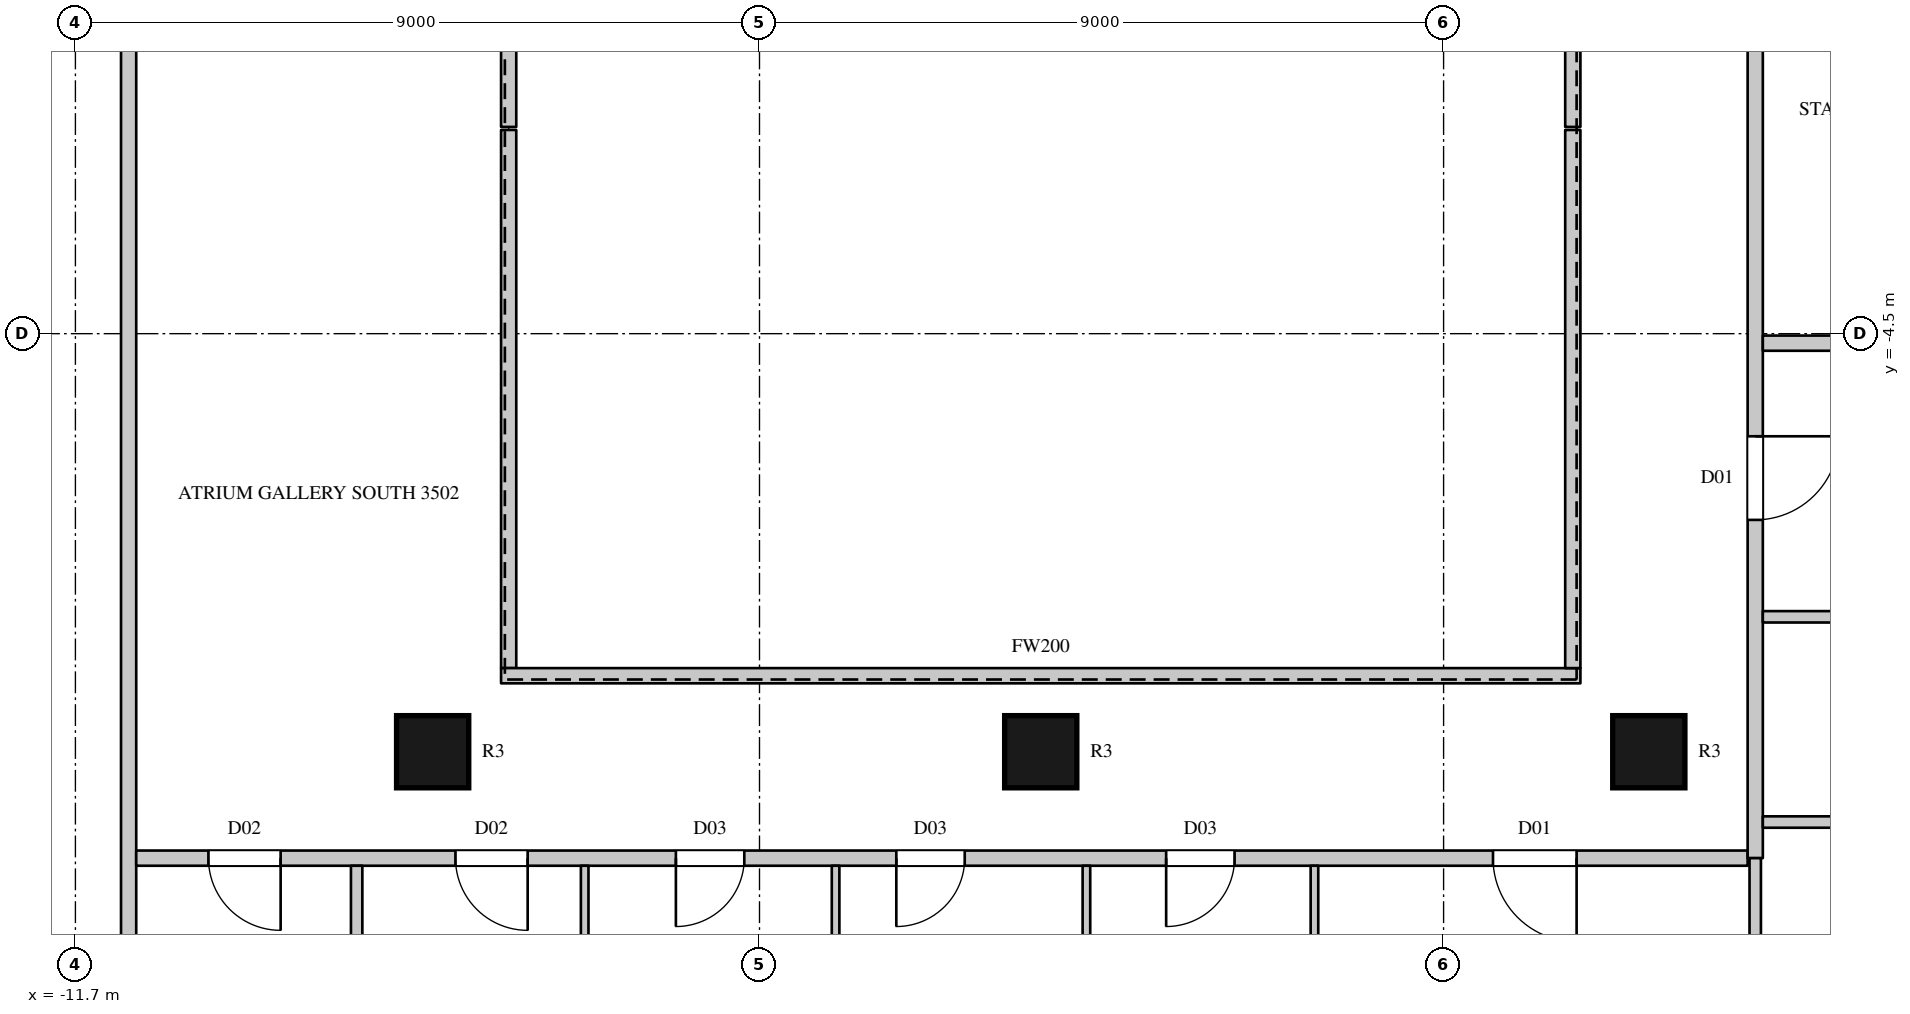
"""IFC4 building model, lengths in metres.
Left out: names, types, materials, properties, quantities, classifications, styles, units other than length and angle.
Written with IfcOpenShell. Run it as: python <this file> out.ifc"""

import sys

from ifc_helpers import new_model, si_unit, direction, frame, frame_2d, origin, origin_2d, place, context, subcontext, project, spatial, rectangle, circle, extrude, element, fill, save


model = new_model("IFC4")
c1 = context("Model", 3, precision=1e-05, world=origin(), true_north=direction((0.0, 1.0)))
c2 = subcontext(c1, "Body", "Model", "MODEL_VIEW")
j1 = project(units=[si_unit("LENGTHUNIT", "METRE"), si_unit("PLANEANGLEUNIT", "RADIAN")], contexts=[c1])
p1 = place(None, origin())
s1 = spatial("IfcSite", under=j1, at=p1, CompositionType="ELEMENT")
p2 = place(p1, origin())
s2 = spatial("IfcBuilding", under=s1, at=p2, CompositionType="ELEMENT")
p3 = place(p2, frame((0.0, 0.0, 164.6)))
s3 = spatial("IfcBuildingStorey", under=s2, at=p3, CompositionType="ELEMENT", Elevation=164.6)
for number, where, z_axis, x_axis in (
    (1, (-7.0, -10.0, 0.0), (0.0, 0.0, 1.0), (1.0, 0.0, 0.0)),
    (2, (1.0, -10.0, 0.0), (0.0, 0.0, 1.0), (1.0, 0.0, 0.0)),
    (3, (9.0, -10.0, 0.0), (0.0, 0.0, 1.0), (1.0, 0.0, 0.0)),
):
    element("IfcColumn", number, at=place(p3, frame(where, z_axis=z_axis, x_axis=x_axis)), inside=s3, PredefinedType="COLUMN", context=c2, shape_type="SweptSolid", body=[
        extrude(circle(Radius=0.475, at=origin_2d()), origin(), (0.0, 0.0, 1.0), 4.1),
    ])
p4 = place(p3, frame((-11.0, -14.8, 0.0), z_axis=(0.0, 0.0, 1.0), x_axis=(0.0, 1.0, 0.0)))
e4 = element("IfcWall", 4, at=p4, inside=s3, PredefinedType="PARTITIONING", context=c2, shape_type="SweptSolid", body=[
    extrude(rectangle(XDim=29.6, YDim=0.2, at=frame_2d((14.8, 0.0))), origin(), (0.0, 0.0, 1.0), 3.8),
])
p5 = place(p4, frame((19.25, 0.0, 0.0)))
e5 = element("IfcOpeningElement", 5, at=p5, cuts=e4, PredefinedType="OPENING", context=c2, shape_type="SweptSolid", body=[
    extrude(rectangle(XDim=1.5, YDim=2.4, at=frame_2d((0.75, 1.2))), frame((0.0, 0.11, 0.0), z_axis=(0.0, -1.0, 0.0), x_axis=(1.0, 0.0, 0.0)), (0.0, 0.0, 1.0), 0.22),
])
p6 = place(p3, frame((-10.9, -11.4, 0.0), z_axis=(0.0, 0.0, 1.0), x_axis=(1.0, 0.0, 0.0)))
e6 = element("IfcWall", 6, at=p6, inside=s3, PredefinedType="PARTITIONING", context=c2, shape_type="SweptSolid", body=[
    extrude(rectangle(XDim=21.2, YDim=0.2, at=frame_2d((10.6, 0.0))), origin(), (0.0, 0.0, 1.0), 3.8),
])
p7 = place(p6, frame((0.95, 0.0, 0.0)))
e7 = element("IfcOpeningElement", 7, at=p7, cuts=e6, PredefinedType="OPENING", context=c2, shape_type="SweptSolid", body=[
    extrude(rectangle(XDim=0.95, YDim=2.2, at=frame_2d((0.475, 1.1))), frame((0.0, 0.11, 0.0), z_axis=(0.0, -1.0, 0.0), x_axis=(1.0, 0.0, 0.0)), (0.0, 0.0, 1.0), 0.22),
])
p8 = place(p6, frame((4.2, 0.0, 0.0)))
e8 = element("IfcOpeningElement", 8, at=p8, cuts=e6, PredefinedType="OPENING", context=c2, shape_type="SweptSolid", body=[
    extrude(rectangle(XDim=0.95, YDim=2.2, at=frame_2d((0.475, 1.1))), frame((0.0, 0.11, 0.0), z_axis=(0.0, -1.0, 0.0), x_axis=(1.0, 0.0, 0.0)), (0.0, 0.0, 1.0), 0.22),
])
p9 = place(p6, frame((7.1, 0.0, 0.0)))
e9 = element("IfcOpeningElement", 9, at=p9, cuts=e6, PredefinedType="OPENING", context=c2, shape_type="SweptSolid", body=[
    extrude(rectangle(XDim=0.9, YDim=2.2, at=frame_2d((0.45, 1.1))), frame((0.0, 0.11, 0.0), z_axis=(0.0, -1.0, 0.0), x_axis=(1.0, 0.0, 0.0)), (0.0, 0.0, 1.0), 0.22),
])
p10 = place(p6, frame((10.0, 0.0, 0.0)))
e10 = element("IfcOpeningElement", 10, at=p10, cuts=e6, PredefinedType="OPENING", context=c2, shape_type="SweptSolid", body=[
    extrude(rectangle(XDim=0.9, YDim=2.2, at=frame_2d((0.45, 1.1))), frame((0.0, 0.11, 0.0), z_axis=(0.0, -1.0, 0.0), x_axis=(1.0, 0.0, 0.0)), (0.0, 0.0, 1.0), 0.22),
])
p11 = place(p6, frame((13.55, 0.0, 0.0)))
e11 = element("IfcOpeningElement", 11, at=p11, cuts=e6, PredefinedType="OPENING", context=c2, shape_type="SweptSolid", body=[
    extrude(rectangle(XDim=0.9, YDim=2.2, at=frame_2d((0.45, 1.1))), frame((0.0, 0.11, 0.0), z_axis=(0.0, -1.0, 0.0), x_axis=(1.0, 0.0, 0.0)), (0.0, 0.0, 1.0), 0.22),
])
p12 = place(p6, frame((17.85, 0.0, 0.0)))
e12 = element("IfcOpeningElement", 12, at=p12, cuts=e6, PredefinedType="OPENING", context=c2, shape_type="SweptSolid", body=[
    extrude(rectangle(XDim=1.1, YDim=2.4, at=frame_2d((0.55, 1.2))), frame((0.0, 0.11, 0.0), z_axis=(0.0, -1.0, 0.0), x_axis=(1.0, 0.0, 0.0)), (0.0, 0.0, 1.0), 0.22),
])
p13 = place(p3, frame((-6.0, -8.9, 0.0), z_axis=(0.0, 0.0, 1.0), x_axis=(0.0, 1.0, 0.0)))
e13 = element("IfcWall", 13, at=p13, inside=s3, PredefinedType="PARTITIONING", context=c2, shape_type="SweptSolid", body=[
    extrude(rectangle(XDim=7.08, YDim=0.2, at=frame_2d((3.54, 0.0))), origin(), (0.0, 0.0, 1.0), 3.8),
])
p14 = place(p3, frame((-6.1, -9.0, 0.0), z_axis=(0.0, 0.0, 1.0), x_axis=(1.0, 0.0, 0.0)))
e14 = element("IfcWall", 14, at=p14, inside=s3, PredefinedType="PARTITIONING", context=c2, shape_type="SweptSolid", body=[
    extrude(rectangle(XDim=14.2, YDim=0.2, at=frame_2d((7.1, 0.0))), origin(), (0.0, 0.0, 1.0), 3.8),
])
p15 = place(p3, frame((-6.0, -1.78, 0.0), z_axis=(0.0, 0.0, 1.0), x_axis=(0.0, 1.0, 0.0)))
e15 = element("IfcWall", 15, at=p15, inside=s3, PredefinedType="PARTITIONING", context=c2, shape_type="SweptSolid", body=[
    extrude(rectangle(XDim=10.68, YDim=0.2, at=frame_2d((5.34, 0.0))), origin(), (0.0, 0.0, 1.0), 3.8),
])
p16 = place(p3, frame((8.0, -8.9, 0.0), z_axis=(0.0, 0.0, 1.0), x_axis=(0.0, 1.0, 0.0)))
e16 = element("IfcWall", 16, at=p16, inside=s3, PredefinedType="PARTITIONING", context=c2, shape_type="SweptSolid", body=[
    extrude(rectangle(XDim=7.08, YDim=0.2, at=frame_2d((3.54, 0.0))), origin(), (0.0, 0.0, 1.0), 3.8),
])
p17 = place(p3, frame((8.0, -1.78, 0.0), z_axis=(0.0, 0.0, 1.0), x_axis=(0.0, 1.0, 0.0)))
e17 = element("IfcWall", 17, at=p17, inside=s3, PredefinedType="PARTITIONING", context=c2, shape_type="SweptSolid", body=[
    extrude(rectangle(XDim=10.68, YDim=0.2, at=frame_2d((5.34, 0.0))), origin(), (0.0, 0.0, 1.0), 3.8),
])
p18 = place(p3, frame((10.4, -11.4, 0.0), z_axis=(0.0, 0.0, 1.0), x_axis=(0.0, 1.0, 0.0)))
e18 = element("IfcWall", 18, at=p18, inside=s3, PredefinedType="PARTITIONING", context=c2, shape_type="SweptSolid", body=[
    extrude(rectangle(XDim=23.5, YDim=0.2, at=frame_2d((11.75, 0.0))), origin(), (0.0, 0.0, 1.0), 3.8),
])
p19 = place(p18, frame((12.1, 0.0, 0.0)))
e19 = element("IfcOpeningElement", 19, at=p19, cuts=e18, PredefinedType="OPENING", context=c2, shape_type="SweptSolid", body=[
    extrude(rectangle(XDim=1.5, YDim=2.4, at=frame_2d((0.75, 1.2))), frame((0.0, 0.11, 0.0), z_axis=(0.0, -1.0, 0.0), x_axis=(1.0, 0.0, 0.0)), (0.0, 0.0, 1.0), 0.22),
])
p20 = place(p18, frame((19.25, 0.0, 0.0)))
e20 = element("IfcOpeningElement", 20, at=p20, cuts=e18, PredefinedType="OPENING", context=c2, shape_type="SweptSolid", body=[
    extrude(rectangle(XDim=1.1, YDim=2.4, at=frame_2d((0.55, 1.2))), frame((0.0, 0.11, 0.0), z_axis=(0.0, -1.0, 0.0), x_axis=(1.0, 0.0, 0.0)), (0.0, 0.0, 1.0), 0.22),
])
p21 = place(p18, frame((4.45, 0.0, 0.0)))
e21 = element("IfcOpeningElement", 21, at=p21, cuts=e18, PredefinedType="OPENING", context=c2, shape_type="SweptSolid", body=[
    extrude(rectangle(XDim=1.1, YDim=2.4, at=frame_2d((0.55, 1.2))), frame((0.0, 0.11, 0.0), z_axis=(0.0, -1.0, 0.0), x_axis=(1.0, 0.0, 0.0)), (0.0, 0.0, 1.0), 0.22),
])
p22 = place(p3, frame((10.5, -4.625, 0.0), z_axis=(0.0, 0.0, 1.0), x_axis=(1.0, 0.0, 0.0)))
e22 = element("IfcWall", 22, at=p22, inside=s3, PredefinedType="PARTITIONING", context=c2, shape_type="SweptSolid", body=[
    extrude(rectangle(XDim=4.175, YDim=0.2, at=frame_2d((2.087, 0.0))), origin(), (0.0, 0.0, 1.0), 3.8),
])
p23 = place(p3, frame((-8.0, -16.7, 0.0), z_axis=(0.0, 0.0, 1.0), x_axis=(0.0, 1.0, 0.0)))
e23 = element("IfcWall", 23, at=p23, inside=s3, PredefinedType="PARTITIONING", context=c2, shape_type="SweptSolid", body=[
    extrude(rectangle(XDim=5.2, YDim=0.15, at=frame_2d((2.6, 0.0))), origin(), (0.0, 0.0, 1.0), 3.8),
])
p24 = place(p3, frame((10.4, -16.7, 0.0), z_axis=(0.0, 0.0, 1.0), x_axis=(0.0, 1.0, 0.0)))
e24 = element("IfcWall", 24, at=p24, inside=s3, PredefinedType="PARTITIONING", context=c2, shape_type="SweptSolid", body=[
    extrude(rectangle(XDim=5.3, YDim=0.15, at=frame_2d((2.65, 0.0))), origin(), (0.0, 0.0, 1.0), 3.8),
])
p25 = place(p3, frame((10.5, -10.925, 0.0), z_axis=(0.0, 0.0, 1.0), x_axis=(1.0, 0.0, 0.0)))
e25 = element("IfcWall", 25, at=p25, inside=s3, PredefinedType="PARTITIONING", context=c2, shape_type="SweptSolid", body=[
    extrude(rectangle(XDim=2.606, YDim=0.15, at=frame_2d((1.303, 0.0))), origin(), (0.0, 0.0, 1.0), 3.8),
])
p26 = place(p25, frame((1.2, 0.0, 0.0)))
e26 = element("IfcOpeningElement", 26, at=p26, cuts=e25, PredefinedType="OPENING", context=c2, shape_type="SweptSolid", body=[
    extrude(rectangle(XDim=0.95, YDim=2.2, at=frame_2d((0.475, 1.1))), frame((0.0, 0.085, 0.0), z_axis=(0.0, -1.0, 0.0), x_axis=(1.0, 0.0, 0.0)), (0.0, 0.0, 1.0), 0.17),
])
p27 = place(p3, frame((10.5, -8.225, 0.0), z_axis=(0.0, 0.0, 1.0), x_axis=(1.0, 0.0, 0.0)))
e27 = element("IfcWall", 27, at=p27, inside=s3, PredefinedType="PARTITIONING", context=c2, shape_type="SweptSolid", body=[
    extrude(rectangle(XDim=3.575, YDim=0.15, at=frame_2d((1.788, 0.0))), origin(), (0.0, 0.0, 1.0), 3.15),
])
for number, where, z_axis, x_axis in (
    (28, (-5.0, -16.7, 0.0), (0.0, 0.0, 1.0), (0.0, 1.0, 0.0)),
    (29, (-1.699, -16.7, 0.0), (0.0, 0.0, 1.0), (0.0, 1.0, 0.0)),
):
    element("IfcWall", number, at=place(p3, frame(where, z_axis=z_axis, x_axis=x_axis)), inside=s3, PredefinedType="PARTITIONING", context=c2, shape_type="SweptSolid", body=[
        extrude(rectangle(XDim=5.2, YDim=0.1, at=frame_2d((2.6, 0.0))), origin(), (0.0, 0.0, 1.0), 3.8),
    ])
p28 = place(p3, frame((1.601, -16.7, 0.0), z_axis=(0.0, 0.0, 1.0), x_axis=(0.0, 1.0, 0.0)))
e30 = element("IfcWall", 30, at=p28, inside=s3, PredefinedType="PARTITIONING", context=c2, shape_type="SweptSolid", body=[
    extrude(rectangle(XDim=5.2, YDim=0.1, at=frame_2d((2.6, 0.0))), origin(), (0.0, 0.0, 1.0), 3.15),
])
p29 = place(p3, frame((4.601, -16.7, 0.0), z_axis=(0.0, 0.0, 1.0), x_axis=(0.0, 1.0, 0.0)))
e31 = element("IfcWall", 31, at=p29, inside=s3, PredefinedType="PARTITIONING", context=c2, shape_type="SweptSolid", body=[
    extrude(rectangle(XDim=5.2, YDim=0.1, at=frame_2d((2.6, 0.0))), origin(), (0.0, 0.0, 1.0), 3.8),
])
p30 = place(p7, origin())
e32 = element("IfcDoor", 32, at=p30, inside=s3, OperationType="SINGLE_SWING_LEFT", PredefinedType="DOOR", context=c2, shape_type="SweptSolid", body=[
    extrude(rectangle(XDim=0.95, YDim=2.2, at=frame_2d((0.475, 1.1))), frame((0.0, 0.025, 0.0), z_axis=(0.0, -1.0, 0.0), x_axis=(1.0, 0.0, 0.0)), (0.0, 0.0, 1.0), 0.05),
])
fill(e7, e32)
p31 = place(p8, origin())
e33 = element("IfcDoor", 33, at=p31, inside=s3, OperationType="SINGLE_SWING_LEFT", PredefinedType="DOOR", context=c2, shape_type="SweptSolid", body=[
    extrude(rectangle(XDim=0.95, YDim=2.2, at=frame_2d((0.475, 1.1))), frame((0.0, 0.025, 0.0), z_axis=(0.0, -1.0, 0.0), x_axis=(1.0, 0.0, 0.0)), (0.0, 0.0, 1.0), 0.05),
])
fill(e8, e33)
p32 = place(p9, origin())
e34 = element("IfcDoor", 34, at=p32, inside=s3, OperationType="SINGLE_SWING_RIGHT", PredefinedType="DOOR", context=c2, shape_type="SweptSolid", body=[
    extrude(rectangle(XDim=0.9, YDim=2.2, at=frame_2d((0.45, 1.1))), frame((0.0, 0.025, 0.0), z_axis=(0.0, -1.0, 0.0), x_axis=(1.0, 0.0, 0.0)), (0.0, 0.0, 1.0), 0.05),
])
fill(e9, e34)
p33 = place(p10, origin())
e35 = element("IfcDoor", 35, at=p33, inside=s3, OperationType="SINGLE_SWING_RIGHT", PredefinedType="DOOR", context=c2, shape_type="SweptSolid", body=[
    extrude(rectangle(XDim=0.9, YDim=2.2, at=frame_2d((0.45, 1.1))), frame((0.0, 0.025, 0.0), z_axis=(0.0, -1.0, 0.0), x_axis=(1.0, 0.0, 0.0)), (0.0, 0.0, 1.0), 0.05),
])
fill(e10, e35)
p34 = place(p11, origin())
e36 = element("IfcDoor", 36, at=p34, inside=s3, OperationType="SINGLE_SWING_RIGHT", PredefinedType="DOOR", context=c2, shape_type="SweptSolid", body=[
    extrude(rectangle(XDim=0.9, YDim=2.2, at=frame_2d((0.45, 1.1))), frame((0.0, 0.025, 0.0), z_axis=(0.0, -1.0, 0.0), x_axis=(1.0, 0.0, 0.0)), (0.0, 0.0, 1.0), 0.05),
])
fill(e11, e36)
p35 = place(p12, origin())
e37 = element("IfcDoor", 37, at=p35, inside=s3, OperationType="SINGLE_SWING_LEFT", PredefinedType="DOOR", context=c2, shape_type="SweptSolid", body=[
    extrude(rectangle(XDim=1.1, YDim=2.4, at=frame_2d((0.55, 1.2))), frame((0.0, 0.025, 0.0), z_axis=(0.0, -1.0, 0.0), x_axis=(1.0, 0.0, 0.0)), (0.0, 0.0, 1.0), 0.05),
])
fill(e12, e37)
p36 = place(p21, origin())
e38 = element("IfcDoor", 38, at=p36, inside=s3, OperationType="SINGLE_SWING_LEFT", PredefinedType="DOOR", context=c2, shape_type="SweptSolid", body=[
    extrude(rectangle(XDim=1.1, YDim=2.4, at=frame_2d((0.55, 1.2))), frame((0.0, 0.025, 0.0), z_axis=(0.0, -1.0, 0.0), x_axis=(1.0, 0.0, 0.0)), (0.0, 0.0, 1.0), 0.05),
])
fill(e21, e38)
save(model, sys.argv[1])
